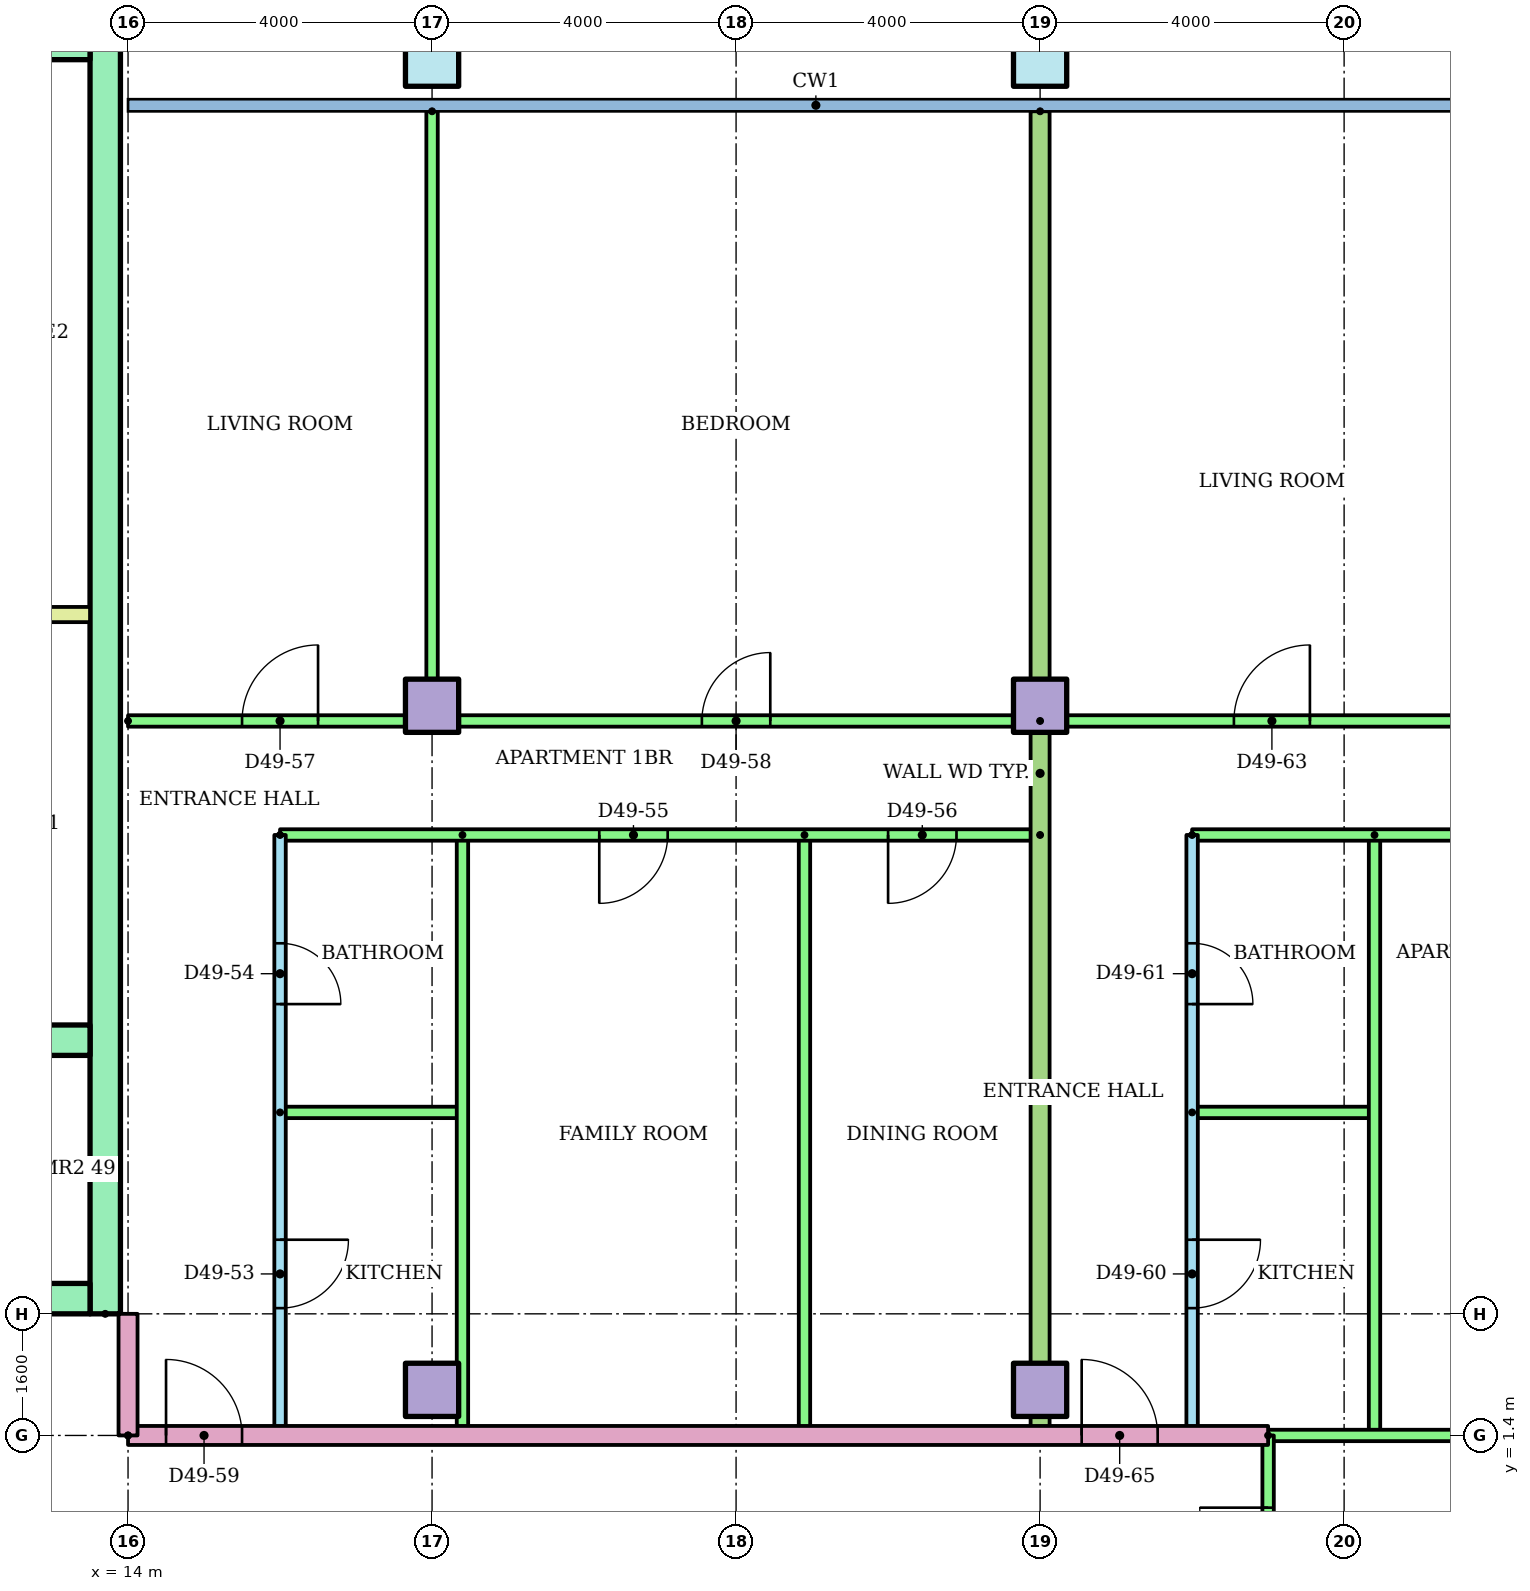
"""IFC4 building model, lengths in metres.
Left out: names, types, materials, properties, quantities, classifications, styles, units other than length and angle.
Written with IfcOpenShell. Run it as: python <this file> out.ifc"""

import sys

from ifc_helpers import new_model, si_unit, direction, frame, frame_2d, origin, origin_2d, place, context, subcontext, project, spatial, rectangle, hollow_rectangle, extrude, element, fill, save


model = new_model("IFC4")
c1 = context("Model", 3, precision=1e-05, world=origin(), true_north=direction((0.0, 1.0)))
c2 = subcontext(c1, "Body", "Model", "MODEL_VIEW")
j1 = project(units=[si_unit("LENGTHUNIT", "METRE"), si_unit("PLANEANGLEUNIT", "RADIAN")], contexts=[c1])
p1 = place(None, origin())
s1 = spatial("IfcSite", under=j1, at=p1, CompositionType="ELEMENT")
p2 = place(p1, origin())
s2 = spatial("IfcBuilding", under=s1, at=p2, CompositionType="ELEMENT")
p3 = place(p2, frame((0.0, 0.0, 187.7)))
s3 = spatial("IfcBuildingStorey", under=s2, at=p3, CompositionType="ELEMENT", Elevation=187.7)
for number, where in (
    (1, (18.0, 2.0, 0.0)),
    (2, (26.0, 2.0, 0.0)),
    (3, (18.0, 11.0, 0.0)),
    (4, (26.0, 11.0, 0.0)),
):
    element("IfcColumn", number, at=place(p3, frame(where)), inside=s3, PredefinedType="COLUMN", context=c2, shape_type="SweptSolid", body=[
        extrude(rectangle(XDim=0.7, YDim=0.7, at=origin_2d()), origin(), (0.0, 0.0, 1.0), 3.2),
    ])
for number, where in (
    (5, (18.0, 19.5, 0.0)),
    (6, (26.0, 19.5, 0.0)),
):
    element("IfcColumn", number, at=place(p3, frame(where)), inside=s3, PredefinedType="COLUMN", context=c2, shape_type="SweptSolid", body=[
        extrude(hollow_rectangle(XDim=0.7, YDim=0.7, WallThickness=0.036, at=origin_2d()), origin(), (0.0, 0.0, 1.0), 3.2),
    ])
p4 = place(p3, frame((13.7, 3.0, 0.0), z_axis=(0.0, 0.0, 1.0), x_axis=(0.0, 1.0, 0.0)))
e7 = element("IfcWall", 7, at=p4, inside=s3, PredefinedType="SHEAR", context=c2, shape_type="SweptSolid", body=[
    extrude(rectangle(XDim=17.0, YDim=0.4, at=frame_2d((8.5, 0.0))), origin(), (0.0, 0.0, 1.0), 2.92),
])
p5 = place(p3, frame((-13.5, 19.7, 0.0)))
e8 = element("IfcWall", 8, at=p5, inside=s3, PredefinedType="SHEAR", context=c2, shape_type="SweptSolid", body=[
    extrude(rectangle(XDim=27.0, YDim=0.4, at=frame_2d((13.5, 0.0))), origin(), (0.0, 0.0, 1.0), 2.92),
])
p6 = place(p3, frame((-13.5, 3.2, 0.0)))
e9 = element("IfcWall", 9, at=p6, inside=s3, PredefinedType="SHEAR", context=c2, shape_type="SweptSolid", body=[
    extrude(rectangle(XDim=27.0, YDim=0.4, at=frame_2d((13.5, 0.0))), origin(), (0.0, 0.0, 1.0), 2.92),
])
p7 = place(p6, frame((22.083, 0.0, 0.0)))
e10 = element("IfcOpeningElement", 10, at=p7, cuts=e9, PredefinedType="OPENING", context=c2, shape_type="SweptSolid", body=[
    extrude(rectangle(XDim=1.1, YDim=2.1, at=frame_2d((0.55, 1.05))), frame((0.0, 0.21, 0.0), z_axis=(0.0, -1.0, 0.0), x_axis=(1.0, 0.0, 0.0)), (0.0, 0.0, 1.0), 0.42),
])
p8 = place(p6, frame((25.128, 0.0, 0.0)))
e11 = element("IfcOpeningElement", 11, at=p8, cuts=e9, PredefinedType="OPENING", context=c2, shape_type="SweptSolid", body=[
    extrude(rectangle(XDim=1.1, YDim=2.1, at=frame_2d((0.55, 1.05))), frame((0.0, 0.21, 0.0), z_axis=(0.0, -1.0, 0.0), x_axis=(1.0, 0.0, 0.0)), (0.0, 0.0, 1.0), 0.42),
])
p9 = place(p6, frame((12.6, 0.0, 0.0)))
e12 = element("IfcOpeningElement", 12, at=p9, cuts=e9, PredefinedType="OPENING", context=c2, shape_type="SweptSolid", body=[
    extrude(rectangle(XDim=1.8, YDim=2.1, at=frame_2d((0.9, 1.05))), frame((0.0, 0.21, 0.0), z_axis=(0.0, -1.0, 0.0), x_axis=(1.0, 0.0, 0.0)), (0.0, 0.0, 1.0), 0.42),
])
p10 = place(p3, frame((1.522, 6.6, 0.0)))
e13 = element("IfcWall", 13, at=p10, inside=s3, PredefinedType="SHEAR", context=c2, shape_type="SweptSolid", body=[
    extrude(rectangle(XDim=11.978, YDim=0.4, at=frame_2d((5.989, 0.0))), origin(), (0.0, 0.0, 1.0), 2.92),
])
p11 = place(p10, frame((2.544, 0.0, 0.0)))
e14 = element("IfcOpeningElement", 14, at=p11, cuts=e13, PredefinedType="OPENING", context=c2, shape_type="SweptSolid", body=[
    extrude(rectangle(XDim=1.0, YDim=2.1, at=frame_2d((0.5, 1.05))), frame((0.0, 0.21, 0.0), z_axis=(0.0, -1.0, 0.0), x_axis=(1.0, 0.0, 0.0)), (0.0, 0.0, 1.0), 0.42),
])
p12 = place(p3, frame((9.6, 12.2, 0.0)))
e15 = element("IfcWall", 15, at=p12, inside=s3, PredefinedType="PARTITIONING", context=c2, shape_type="SweptSolid", body=[
    extrude(rectangle(XDim=3.9, YDim=0.2, at=frame_2d((1.95, 0.0))), origin(), (0.0, 0.0, 1.0), 2.92),
])
p13 = place(p3, frame((16.0, 9.3, 0.0), z_axis=(0.0, 0.0, 1.0), x_axis=(0.0, -1.0, 0.0)))
e16 = element("IfcWall", 16, at=p13, inside=s3, PredefinedType="PARTITIONING", context=c2, shape_type="SweptSolid", body=[
    extrude(rectangle(XDim=7.9, YDim=0.15, at=frame_2d((3.95, 0.0))), origin(), (0.0, 0.0, 1.0), 2.4),
])
p14 = place(p13, frame((5.325, 0.0, 0.0)))
e17 = element("IfcOpeningElement", 17, at=p14, cuts=e16, PredefinedType="OPENING", context=c2, shape_type="SweptSolid", body=[
    extrude(rectangle(XDim=0.9, YDim=2.1, at=frame_2d((0.45, 1.05))), frame((0.0, 0.085, 0.0), z_axis=(0.0, -1.0, 0.0), x_axis=(1.0, 0.0, 0.0)), (0.0, 0.0, 1.0), 0.17),
])
p15 = place(p13, frame((1.425, 0.0, 0.0)))
e18 = element("IfcOpeningElement", 18, at=p15, cuts=e16, PredefinedType="OPENING", context=c2, shape_type="SweptSolid", body=[
    extrude(rectangle(XDim=0.8, YDim=2.1, at=frame_2d((0.4, 1.05))), frame((0.0, 0.085, 0.0), z_axis=(0.0, -1.0, 0.0), x_axis=(1.0, 0.0, 0.0)), (0.0, 0.0, 1.0), 0.17),
])
p16 = place(p3, frame((16.0, 5.65, 0.0)))
e19 = element("IfcWall", 19, at=p16, inside=s3, PredefinedType="PARTITIONING", context=c2, shape_type="SweptSolid", body=[
    extrude(rectangle(XDim=2.4, YDim=0.15, at=frame_2d((1.2, 0.0))), origin(), (0.0, 0.0, 1.0), 2.4),
])
for number, where, z_axis, x_axis in (
    (20, (18.4, 9.3, 0.0), (0.0, 0.0, 1.0), (0.0, -1.0, 0.0)),
    (21, (22.9, 9.3, 0.0), (0.0, 0.0, 1.0), (0.0, -1.0, 0.0)),
):
    element("IfcWall", number, at=place(p3, frame(where, z_axis=z_axis, x_axis=x_axis)), inside=s3, PredefinedType="PARTITIONING", context=c2, shape_type="SweptSolid", body=[
        extrude(rectangle(XDim=7.9, YDim=0.15, at=frame_2d((3.95, 0.0))), origin(), (0.0, 0.0, 1.0), 2.4),
    ])
p17 = place(p3, frame((26.0, 9.3, 0.0), z_axis=(0.0, 0.0, 1.0), x_axis=(-1.0, 0.0, 0.0)))
e22 = element("IfcWall", 22, at=p17, inside=s3, PredefinedType="PARTITIONING", context=c2, shape_type="SweptSolid", body=[
    extrude(rectangle(XDim=10.0, YDim=0.15, at=frame_2d((5.0, 0.0))), origin(), (0.0, 0.0, 1.0), 2.4),
])
p18 = place(p17, frame((4.9, 0.0, 0.0)))
e23 = element("IfcOpeningElement", 23, at=p18, cuts=e22, PredefinedType="OPENING", context=c2, shape_type="SweptSolid", body=[
    extrude(rectangle(XDim=0.9, YDim=2.1, at=frame_2d((0.45, 1.05))), frame((0.0, 0.085, 0.0), z_axis=(0.0, -1.0, 0.0), x_axis=(1.0, 0.0, 0.0)), (0.0, 0.0, 1.0), 0.17),
])
p19 = place(p17, frame((1.1, 0.0, 0.0)))
e24 = element("IfcOpeningElement", 24, at=p19, cuts=e22, PredefinedType="OPENING", context=c2, shape_type="SweptSolid", body=[
    extrude(rectangle(XDim=0.9, YDim=2.1, at=frame_2d((0.45, 1.05))), frame((0.0, 0.085, 0.0), z_axis=(0.0, -1.0, 0.0), x_axis=(1.0, 0.0, 0.0)), (0.0, 0.0, 1.0), 0.17),
])
p20 = place(p3, frame((14.0, 10.8, 0.0)))
e25 = element("IfcWall", 25, at=p20, inside=s3, PredefinedType="PARTITIONING", context=c2, shape_type="SweptSolid", body=[
    extrude(rectangle(XDim=12.0, YDim=0.15, at=frame_2d((6.0, 0.0))), origin(), (0.0, 0.0, 1.0), 2.4),
])
p21 = place(p20, frame((1.5, 0.0, 0.0)))
e26 = element("IfcOpeningElement", 26, at=p21, cuts=e25, PredefinedType="OPENING", context=c2, shape_type="SweptSolid", body=[
    extrude(rectangle(XDim=1.0, YDim=2.1, at=frame_2d((0.5, 1.05))), frame((0.0, 0.085, 0.0), z_axis=(0.0, -1.0, 0.0), x_axis=(1.0, 0.0, 0.0)), (0.0, 0.0, 1.0), 0.17),
])
p22 = place(p20, frame((7.55, 0.0, 0.0)))
e27 = element("IfcOpeningElement", 27, at=p22, cuts=e25, PredefinedType="OPENING", context=c2, shape_type="SweptSolid", body=[
    extrude(rectangle(XDim=0.9, YDim=2.1, at=frame_2d((0.45, 1.05))), frame((0.0, 0.085, 0.0), z_axis=(0.0, -1.0, 0.0), x_axis=(1.0, 0.0, 0.0)), (0.0, 0.0, 1.0), 0.17),
])
p23 = place(p3, frame((18.0, 18.821, 0.0), z_axis=(0.0, 0.0, 1.0), x_axis=(0.0, -1.0, 0.0)))
e28 = element("IfcWall", 28, at=p23, inside=s3, PredefinedType="PARTITIONING", context=c2, shape_type="SweptSolid", body=[
    extrude(rectangle(XDim=8.021, YDim=0.15, at=frame_2d((4.01, 0.0))), origin(), (0.0, 0.0, 1.0), 2.4),
])
p24 = place(p3, frame((28.0, 9.3, 0.0), z_axis=(0.0, 0.0, 1.0), x_axis=(0.0, -1.0, 0.0)))
e29 = element("IfcWall", 29, at=p24, inside=s3, PredefinedType="PARTITIONING", context=c2, shape_type="SweptSolid", body=[
    extrude(rectangle(XDim=7.9, YDim=0.15, at=frame_2d((3.95, 0.0))), origin(), (0.0, 0.0, 1.0), 2.4),
])
p25 = place(p24, frame((5.325, 0.0, 0.0)))
e30 = element("IfcOpeningElement", 30, at=p25, cuts=e29, PredefinedType="OPENING", context=c2, shape_type="SweptSolid", body=[
    extrude(rectangle(XDim=0.9, YDim=2.1, at=frame_2d((0.45, 1.05))), frame((0.0, 0.085, 0.0), z_axis=(0.0, -1.0, 0.0), x_axis=(1.0, 0.0, 0.0)), (0.0, 0.0, 1.0), 0.17),
])
p26 = place(p24, frame((1.425, 0.0, 0.0)))
e31 = element("IfcOpeningElement", 31, at=p26, cuts=e29, PredefinedType="OPENING", context=c2, shape_type="SweptSolid", body=[
    extrude(rectangle(XDim=0.8, YDim=2.1, at=frame_2d((0.4, 1.05))), frame((0.0, 0.085, 0.0), z_axis=(0.0, -1.0, 0.0), x_axis=(1.0, 0.0, 0.0)), (0.0, 0.0, 1.0), 0.17),
])
p27 = place(p3, frame((28.0, 5.65, 0.0)))
e32 = element("IfcWall", 32, at=p27, inside=s3, PredefinedType="PARTITIONING", context=c2, shape_type="SweptSolid", body=[
    extrude(rectangle(XDim=2.4, YDim=0.15, at=frame_2d((1.2, 0.0))), origin(), (0.0, 0.0, 1.0), 2.4),
])
p28 = place(p3, frame((30.4, 9.3, 0.0), z_axis=(0.0, 0.0, 1.0), x_axis=(0.0, -1.0, 0.0)))
e33 = element("IfcWall", 33, at=p28, inside=s3, PredefinedType="PARTITIONING", context=c2, shape_type="SweptSolid", body=[
    extrude(rectangle(XDim=7.9, YDim=0.15, at=frame_2d((3.95, 0.0))), origin(), (0.0, 0.0, 1.0), 2.4),
])
p29 = place(p3, frame((36.81, 9.3, 0.0), z_axis=(0.0, 0.0, 1.0), x_axis=(-1.0, 0.0, 0.0)))
e34 = element("IfcWall", 34, at=p29, inside=s3, PredefinedType="PARTITIONING", context=c2, shape_type="SweptSolid", body=[
    extrude(rectangle(XDim=8.81, YDim=0.15, at=frame_2d((4.405, 0.0))), origin(), (0.0, 0.0, 1.0), 2.4),
])
p30 = place(p29, frame((3.357, 0.0, 0.0)))
e35 = element("IfcOpeningElement", 35, at=p30, cuts=e34, PredefinedType="OPENING", context=c2, shape_type="SweptSolid", body=[
    extrude(rectangle(XDim=0.9, YDim=2.1, at=frame_2d((0.45, 1.05))), frame((0.0, 0.085, 0.0), z_axis=(0.0, -1.0, 0.0), x_axis=(1.0, 0.0, 0.0)), (0.0, 0.0, 1.0), 0.17),
])
p31 = place(p3, frame((26.0, 10.8, 0.0)))
e36 = element("IfcWall", 36, at=p31, inside=s3, PredefinedType="PARTITIONING", context=c2, shape_type="SweptSolid", body=[
    extrude(rectangle(XDim=10.81, YDim=0.15, at=frame_2d((5.405, 0.0))), origin(), (0.0, 0.0, 1.0), 2.4),
])
p32 = place(p31, frame((2.55, 0.0, 0.0)))
e37 = element("IfcOpeningElement", 37, at=p32, cuts=e36, PredefinedType="OPENING", context=c2, shape_type="SweptSolid", body=[
    extrude(rectangle(XDim=1.0, YDim=2.1, at=frame_2d((0.5, 1.05))), frame((0.0, 0.085, 0.0), z_axis=(0.0, -1.0, 0.0), x_axis=(1.0, 0.0, 0.0)), (0.0, 0.0, 1.0), 0.17),
])
p33 = place(p31, frame((8.547, 0.0, 0.0)))
e38 = element("IfcOpeningElement", 38, at=p33, cuts=e36, PredefinedType="OPENING", context=c2, shape_type="SweptSolid", body=[
    extrude(rectangle(XDim=0.9, YDim=2.1, at=frame_2d((0.45, 1.05))), frame((0.0, 0.085, 0.0), z_axis=(0.0, -1.0, 0.0), x_axis=(1.0, 0.0, 0.0)), (0.0, 0.0, 1.0), 0.17),
])
p34 = place(p3, frame((26.0, 18.821, 0.0), z_axis=(0.0, 0.0, 1.0), x_axis=(0.0, -1.0, 0.0)))
e39 = element("IfcWall", 39, at=p34, inside=s3, PredefinedType="PARTITIONING", context=c2, shape_type="SweptSolid", body=[
    extrude(rectangle(XDim=17.421, YDim=0.25, at=frame_2d((8.71, 0.0))), origin(), (0.0, 0.0, 1.0), 2.4),
])
p35 = place(p3, frame((14.0, 1.4, 0.0)))
e40 = element("IfcWall", 40, at=p35, inside=s3, PredefinedType="PARTITIONING", context=c2, shape_type="SweptSolid", body=[
    extrude(rectangle(XDim=15.0, YDim=0.25, at=frame_2d((7.5, 0.0))), origin(), (0.0, 0.0, 1.0), 2.4),
])
p36 = place(p35, frame((0.5, 0.0, 0.0)))
e41 = element("IfcOpeningElement", 41, at=p36, cuts=e40, PredefinedType="OPENING", context=c2, shape_type="SweptSolid", body=[
    extrude(rectangle(XDim=1.0, YDim=2.1, at=frame_2d((0.5, 1.05))), frame((0.0, 0.135, 0.0), z_axis=(0.0, -1.0, 0.0), x_axis=(1.0, 0.0, 0.0)), (0.0, 0.0, 1.0), 0.27),
])
p37 = place(p35, frame((12.547, 0.0, 0.0)))
e42 = element("IfcOpeningElement", 42, at=p37, cuts=e40, PredefinedType="OPENING", context=c2, shape_type="SweptSolid", body=[
    extrude(rectangle(XDim=1.0, YDim=2.1, at=frame_2d((0.5, 1.05))), frame((0.0, 0.135, 0.0), z_axis=(0.0, -1.0, 0.0), x_axis=(1.0, 0.0, 0.0)), (0.0, 0.0, 1.0), 0.27),
])
p38 = place(p3, frame((29.0, 1.4, 0.0)))
e43 = element("IfcWall", 43, at=p38, inside=s3, PredefinedType="PARTITIONING", context=c2, shape_type="SweptSolid", body=[
    extrude(rectangle(XDim=7.82, YDim=0.15, at=frame_2d((3.91, 0.0))), origin(), (0.0, 0.0, 1.0), 2.4),
])
p39 = place(p3, frame((29.0, -1.4, 0.0), z_axis=(0.0, 0.0, 1.0), x_axis=(0.0, 1.0, 0.0)))
e44 = element("IfcWall", 44, at=p39, inside=s3, PredefinedType="PARTITIONING", context=c2, shape_type="SweptSolid", body=[
    extrude(rectangle(XDim=2.8, YDim=0.15, at=frame_2d((1.4, 0.0))), origin(), (0.0, 0.0, 1.0), 2.4),
])
p40 = place(p39, frame((0.95, 0.0, 0.0)))
e45 = element("IfcOpeningElement", 45, at=p40, cuts=e44, PredefinedType="OPENING", context=c2, shape_type="SweptSolid", body=[
    extrude(rectangle(XDim=0.9, YDim=2.1, at=frame_2d((0.45, 1.05))), frame((0.0, 0.085, 0.0), z_axis=(0.0, -1.0, 0.0), x_axis=(1.0, 0.0, 0.0)), (0.0, 0.0, 1.0), 0.17),
])
p41 = place(p3, frame((14.0, 1.4, 0.0), z_axis=(0.0, 0.0, 1.0), x_axis=(0.0, 1.0, 0.0)))
e46 = element("IfcWall", 46, at=p41, inside=s3, PredefinedType="PARTITIONING", context=c2, shape_type="SweptSolid", body=[
    extrude(rectangle(XDim=1.6, YDim=0.25, at=frame_2d((0.8, 0.0))), origin(), (0.0, 0.0, 1.0), 2.4),
])
p42 = place(p14, origin())
e47 = element("IfcDoor", 47, at=p42, inside=s3, OperationType="SINGLE_SWING_LEFT", PredefinedType="DOOR", context=c2, shape_type="SweptSolid", body=[
    extrude(rectangle(XDim=0.9, YDim=2.1, at=frame_2d((0.45, 1.05))), frame((0.0, 0.025, 0.0), z_axis=(0.0, -1.0, 0.0), x_axis=(1.0, 0.0, 0.0)), (0.0, 0.0, 1.0), 0.05),
])
fill(e17, e47)
p43 = place(p15, origin())
e48 = element("IfcDoor", 48, at=p43, inside=s3, OperationType="SINGLE_SWING_RIGHT", PredefinedType="DOOR", context=c2, shape_type="SweptSolid", body=[
    extrude(rectangle(XDim=0.8, YDim=2.1, at=frame_2d((0.4, 1.05))), frame((0.0, 0.025, 0.0), z_axis=(0.0, -1.0, 0.0), x_axis=(1.0, 0.0, 0.0)), (0.0, 0.0, 1.0), 0.05),
])
fill(e18, e48)
p44 = place(p18, origin())
e49 = element("IfcDoor", 49, at=p44, inside=s3, OperationType="SINGLE_SWING_RIGHT", PredefinedType="DOOR", context=c2, shape_type="SweptSolid", body=[
    extrude(rectangle(XDim=0.9, YDim=2.1, at=frame_2d((0.45, 1.05))), frame((0.0, 0.025, 0.0), z_axis=(0.0, -1.0, 0.0), x_axis=(1.0, 0.0, 0.0)), (0.0, 0.0, 1.0), 0.05),
])
fill(e23, e49)
p45 = place(p19, origin())
e50 = element("IfcDoor", 50, at=p45, inside=s3, OperationType="SINGLE_SWING_RIGHT", PredefinedType="DOOR", context=c2, shape_type="SweptSolid", body=[
    extrude(rectangle(XDim=0.9, YDim=2.1, at=frame_2d((0.45, 1.05))), frame((0.0, 0.025, 0.0), z_axis=(0.0, -1.0, 0.0), x_axis=(1.0, 0.0, 0.0)), (0.0, 0.0, 1.0), 0.05),
])
fill(e24, e50)
p46 = place(p21, origin())
e51 = element("IfcDoor", 51, at=p46, inside=s3, OperationType="SINGLE_SWING_RIGHT", PredefinedType="DOOR", context=c2, shape_type="SweptSolid", body=[
    extrude(rectangle(XDim=1.0, YDim=2.1, at=frame_2d((0.5, 1.05))), frame((0.0, 0.025, 0.0), z_axis=(0.0, -1.0, 0.0), x_axis=(1.0, 0.0, 0.0)), (0.0, 0.0, 1.0), 0.05),
])
fill(e26, e51)
p47 = place(p22, origin())
e52 = element("IfcDoor", 52, at=p47, inside=s3, OperationType="SINGLE_SWING_RIGHT", PredefinedType="DOOR", context=c2, shape_type="SweptSolid", body=[
    extrude(rectangle(XDim=0.9, YDim=2.1, at=frame_2d((0.45, 1.05))), frame((0.0, 0.025, 0.0), z_axis=(0.0, -1.0, 0.0), x_axis=(1.0, 0.0, 0.0)), (0.0, 0.0, 1.0), 0.05),
])
fill(e27, e52)
p48 = place(p36, origin())
e53 = element("IfcDoor", 53, at=p48, inside=s3, OperationType="SINGLE_SWING_LEFT", PredefinedType="DOOR", context=c2, shape_type="SweptSolid", body=[
    extrude(rectangle(XDim=1.0, YDim=2.1, at=frame_2d((0.5, 1.05))), frame((0.0, 0.025, 0.0), z_axis=(0.0, -1.0, 0.0), x_axis=(1.0, 0.0, 0.0)), (0.0, 0.0, 1.0), 0.05),
])
fill(e41, e53)
p49 = place(p25, origin())
e54 = element("IfcDoor", 54, at=p49, inside=s3, OperationType="SINGLE_SWING_LEFT", PredefinedType="DOOR", context=c2, shape_type="SweptSolid", body=[
    extrude(rectangle(XDim=0.9, YDim=2.1, at=frame_2d((0.45, 1.05))), frame((0.0, 0.025, 0.0), z_axis=(0.0, -1.0, 0.0), x_axis=(1.0, 0.0, 0.0)), (0.0, 0.0, 1.0), 0.05),
])
fill(e30, e54)
p50 = place(p26, origin())
e55 = element("IfcDoor", 55, at=p50, inside=s3, OperationType="SINGLE_SWING_RIGHT", PredefinedType="DOOR", context=c2, shape_type="SweptSolid", body=[
    extrude(rectangle(XDim=0.8, YDim=2.1, at=frame_2d((0.4, 1.05))), frame((0.0, 0.025, 0.0), z_axis=(0.0, -1.0, 0.0), x_axis=(1.0, 0.0, 0.0)), (0.0, 0.0, 1.0), 0.05),
])
fill(e31, e55)
p51 = place(p32, origin())
e56 = element("IfcDoor", 56, at=p51, inside=s3, OperationType="SINGLE_SWING_RIGHT", PredefinedType="DOOR", context=c2, shape_type="SweptSolid", body=[
    extrude(rectangle(XDim=1.0, YDim=2.1, at=frame_2d((0.5, 1.05))), frame((0.0, 0.025, 0.0), z_axis=(0.0, -1.0, 0.0), x_axis=(1.0, 0.0, 0.0)), (0.0, 0.0, 1.0), 0.05),
])
fill(e37, e56)
p52 = place(p37, origin())
e57 = element("IfcDoor", 57, at=p52, inside=s3, OperationType="SINGLE_SWING_LEFT", PredefinedType="DOOR", context=c2, shape_type="SweptSolid", body=[
    extrude(rectangle(XDim=1.0, YDim=2.1, at=frame_2d((0.5, 1.05))), frame((0.0, 0.025, 0.0), z_axis=(0.0, -1.0, 0.0), x_axis=(1.0, 0.0, 0.0)), (0.0, 0.0, 1.0), 0.05),
])
fill(e42, e57)
p53 = place(p40, origin())
e58 = element("IfcDoor", 58, at=p53, inside=s3, OperationType="SINGLE_SWING_RIGHT", PredefinedType="DOOR", context=c2, shape_type="SweptSolid", body=[
    extrude(rectangle(XDim=0.9, YDim=2.1, at=frame_2d((0.45, 1.05))), frame((0.0, 0.025, 0.0), z_axis=(0.0, -1.0, 0.0), x_axis=(1.0, 0.0, 0.0)), (0.0, 0.0, 1.0), 0.05),
])
fill(e45, e58)
save(model, sys.argv[1])
